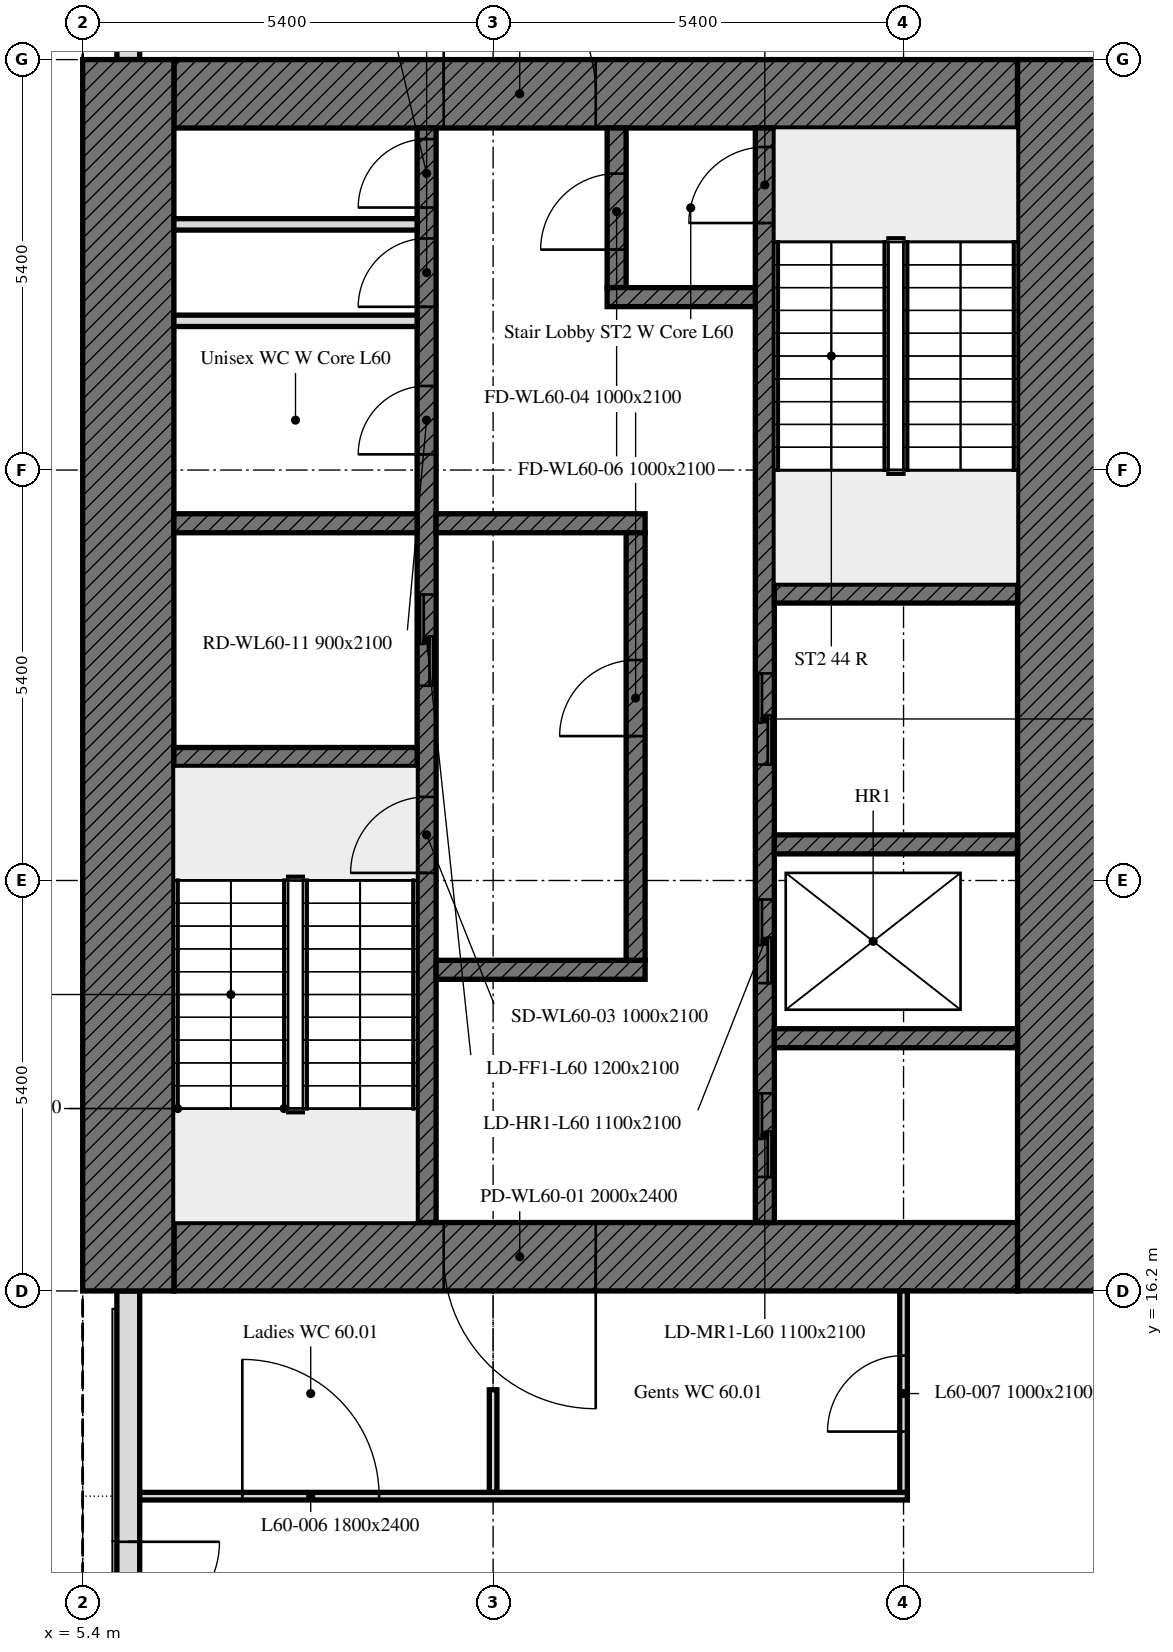
"""IFC4 building model, lengths in metres.
Left out: names, types, materials, properties, quantities, classifications, styles, units other than length and angle.
Written with IfcOpenShell. Run it as: python <this file> out.ifc"""

import sys

from ifc_helpers import new_model, si_unit, direction, frame, frame_2d, origin, place, context, subcontext, project, spatial, rectangle, extrude, element, fill, save


model = new_model("IFC4")
c1 = context("Model", 3, precision=1e-05, world=origin(), true_north=direction((0.0, 1.0)))
c2 = subcontext(c1, "Body", "Model", "MODEL_VIEW")
j1 = project(units=[si_unit("LENGTHUNIT", "METRE"), si_unit("PLANEANGLEUNIT", "RADIAN")], contexts=[c1])
p1 = place(None, origin())
s1 = spatial("IfcSite", under=j1, at=p1, CompositionType="ELEMENT")
p2 = place(p1, origin())
s2 = spatial("IfcBuilding", under=s1, at=p2, CompositionType="ELEMENT")
p3 = place(p2, frame((0.0, 0.0, 243.1)))
s3 = spatial("IfcBuildingStorey", under=s2, at=p3, CompositionType="ELEMENT", Elevation=243.1)
p4 = place(p3, frame((6.0, 42.6, 0.0), z_axis=(0.0, 0.0, 1.0), x_axis=(0.0, -1.0, 0.0)))
e1 = element("IfcWall", 1, at=p4, inside=s3, PredefinedType="SOLIDWALL", context=c2, shape_type="SweptSolid", body=[
    extrude(rectangle(XDim=10.2, YDim=0.3, at=frame_2d((5.1, 0.0))), origin(), (0.0, 0.0, 1.0), 7.5),
])
p5 = place(p4, frame((1.2, 0.0, 0.0)))
e2 = element("IfcOpeningElement", 2, at=p5, cuts=e1, PredefinedType="OPENING", context=c2, shape_type="SweptSolid", body=[
    extrude(rectangle(XDim=1.8, YDim=2.4, at=frame_2d((0.9, 1.2))), frame((0.0, 0.16, 0.0), z_axis=(0.0, -1.0, 0.0), x_axis=(1.0, 0.0, 0.0)), (0.0, 0.0, 1.0), 0.32),
])
p6 = place(p4, frame((7.4, 0.0, 0.0)))
e3 = element("IfcOpeningElement", 3, at=p6, cuts=e1, PredefinedType="OPENING", context=c2, shape_type="SweptSolid", body=[
    extrude(rectangle(XDim=1.8, YDim=2.4, at=frame_2d((0.9, 1.2))), frame((0.0, 0.16, 0.0), z_axis=(0.0, -1.0, 0.0), x_axis=(1.0, 0.0, 0.0)), (0.0, 0.0, 1.0), 0.32),
])
p7 = place(p3, frame((6.0, 16.2, 0.0), z_axis=(0.0, 0.0, 1.0), x_axis=(0.0, -1.0, 0.0)))
e4 = element("IfcWall", 4, at=p7, inside=s3, PredefinedType="SOLIDWALL", context=c2, shape_type="SweptSolid", body=[
    extrude(rectangle(XDim=15.75, YDim=0.3, at=frame_2d((7.875, 0.0))), origin(), (0.0, 0.0, 1.0), 7.5),
])
p8 = place(p7, frame((3.3, 0.0, 0.0)))
e5 = element("IfcOpeningElement", 5, at=p8, cuts=e4, PredefinedType="OPENING", context=c2, shape_type="SweptSolid", body=[
    extrude(rectangle(XDim=1.2, YDim=2.4, at=frame_2d((0.6, 1.2))), frame((0.0, 0.16, 0.0), z_axis=(0.0, -1.0, 0.0), x_axis=(1.0, 0.0, 0.0)), (0.0, 0.0, 1.0), 0.32),
])
p9 = place(p7, frame((7.2, 0.0, 0.0)))
e6 = element("IfcOpeningElement", 6, at=p9, cuts=e4, PredefinedType="OPENING", context=c2, shape_type="SweptSolid", body=[
    extrude(rectangle(XDim=1.8, YDim=2.4, at=frame_2d((0.9, 1.2))), frame((0.0, 0.16, 0.0), z_axis=(0.0, -1.0, 0.0), x_axis=(1.0, 0.0, 0.0)), (0.0, 0.0, 1.0), 0.32),
])
p10 = place(p7, frame((12.6, 0.0, 0.0)))
e7 = element("IfcOpeningElement", 7, at=p10, cuts=e4, PredefinedType="OPENING", context=c2, shape_type="SweptSolid", body=[
    extrude(rectangle(XDim=1.8, YDim=2.4, at=frame_2d((0.9, 1.2))), frame((0.0, 0.16, 0.0), z_axis=(0.0, -1.0, 0.0), x_axis=(1.0, 0.0, 0.0)), (0.0, 0.0, 1.0), 0.32),
])
p11 = place(p3, frame((17.7, 16.65, 0.0), z_axis=(0.0, 0.0, 1.0), x_axis=(-1.0, 0.0, 0.0)))
e8 = element("IfcWall", 8, at=p11, inside=s3, PredefinedType="SOLIDWALL", context=c2, shape_type="SweptSolid", body=[
    extrude(rectangle(XDim=11.1, YDim=0.9, at=frame_2d((5.55, 0.0))), origin(), (0.0, 0.0, 1.0), 7.5),
])
p12 = place(p11, frame((5.55, 0.0, 0.0)))
e9 = element("IfcOpeningElement", 9, at=p12, cuts=e8, PredefinedType="OPENING", context=c2, shape_type="SweptSolid", body=[
    extrude(rectangle(XDim=2.0, YDim=2.4, at=frame_2d((1.0, 1.2))), frame((0.0, 0.45, 0.0), z_axis=(0.0, -1.0, 0.0), x_axis=(1.0, 0.0, 0.0)), (0.0, 0.0, 1.0), 0.9),
])
p13 = place(p3, frame((6.6, 31.95, 0.0), z_axis=(0.0, 0.0, 1.0), x_axis=(1.0, 0.0, 0.0)))
e10 = element("IfcWall", 10, at=p13, inside=s3, PredefinedType="SOLIDWALL", context=c2, shape_type="SweptSolid", body=[
    extrude(rectangle(XDim=11.1, YDim=0.9, at=frame_2d((5.55, 0.0))), origin(), (0.0, 0.0, 1.0), 7.5),
])
p14 = place(p13, frame((3.55, 0.0, 0.0)))
e11 = element("IfcOpeningElement", 11, at=p14, cuts=e10, PredefinedType="OPENING", context=c2, shape_type="SweptSolid", body=[
    extrude(rectangle(XDim=2.0, YDim=2.4, at=frame_2d((1.0, 1.2))), frame((0.0, 0.45, 0.0), z_axis=(0.0, -1.0, 0.0), x_axis=(1.0, 0.0, 0.0)), (0.0, 0.0, 1.0), 0.9),
])
for number, where, z_axis, x_axis in (
    (12, (6.0, 16.2, 0.0), (0.0, 0.0, 1.0), (0.0, 1.0, 0.0)),
    (13, (18.3, 32.4, 0.0), (0.0, 0.0, 1.0), (0.0, -1.0, 0.0)),
):
    element("IfcWall", number, at=place(p3, frame(where, z_axis=z_axis, x_axis=x_axis)), inside=s3, PredefinedType="SOLIDWALL", context=c2, shape_type="SweptSolid", body=[
        extrude(rectangle(XDim=16.2, YDim=1.2, at=frame_2d((8.1, 0.0))), origin(), (0.0, 0.0, 1.0), 7.5),
    ])
p15 = place(p3, frame((9.925, 17.1, 0.0), z_axis=(0.0, 0.0, 1.0), x_axis=(0.0, 1.0, 0.0)))
e14 = element("IfcWall", 14, at=p15, inside=s3, PredefinedType="SOLIDWALL", context=c2, shape_type="SweptSolid", body=[
    extrude(rectangle(XDim=14.4, YDim=0.25, at=frame_2d((7.2, 0.0))), origin(), (0.0, 0.0, 1.0), 7.5),
])
p16 = place(p15, frame((4.6, 0.0, 0.0)))
e15 = element("IfcOpeningElement", 15, at=p16, cuts=e14, PredefinedType="OPENING", context=c2, shape_type="SweptSolid", body=[
    extrude(rectangle(XDim=1.0, YDim=2.1, at=frame_2d((0.5, 1.05))), frame((0.0, 0.125, 0.0), z_axis=(0.0, -1.0, 0.0), x_axis=(1.0, 0.0, 0.0)), (0.0, 0.0, 1.0), 0.25),
])
p17 = place(p15, frame((7.062, 0.0, 0.0)))
e16 = element("IfcOpeningElement", 16, at=p17, cuts=e14, PredefinedType="OPENING", context=c2, shape_type="SweptSolid", body=[
    extrude(rectangle(XDim=1.2, YDim=2.1, at=frame_2d((0.6, 1.05))), frame((0.0, 0.125, 0.0), z_axis=(0.0, -1.0, 0.0), x_axis=(1.0, 0.0, 0.0)), (0.0, 0.0, 1.0), 0.25),
])
p18 = place(p15, frame((10.106, 0.0, 0.0)))
e17 = element("IfcOpeningElement", 17, at=p18, cuts=e14, PredefinedType="OPENING", context=c2, shape_type="SweptSolid", body=[
    extrude(rectangle(XDim=0.9, YDim=2.1, at=frame_2d((0.45, 1.05))), frame((0.0, 0.125, 0.0), z_axis=(0.0, -1.0, 0.0), x_axis=(1.0, 0.0, 0.0)), (0.0, 0.0, 1.0), 0.25),
])
p19 = place(p15, frame((12.048, 0.0, 0.0)))
e18 = element("IfcOpeningElement", 18, at=p19, cuts=e14, PredefinedType="OPENING", context=c2, shape_type="SweptSolid", body=[
    extrude(rectangle(XDim=0.9, YDim=2.1, at=frame_2d((0.45, 1.05))), frame((0.0, 0.125, 0.0), z_axis=(0.0, -1.0, 0.0), x_axis=(1.0, 0.0, 0.0)), (0.0, 0.0, 1.0), 0.25),
])
p20 = place(p15, frame((13.354, 0.0, 0.0)))
e19 = element("IfcOpeningElement", 19, at=p20, cuts=e14, PredefinedType="OPENING", context=c2, shape_type="SweptSolid", body=[
    extrude(rectangle(XDim=0.9, YDim=2.1, at=frame_2d((0.45, 1.05))), frame((0.0, 0.125, 0.0), z_axis=(0.0, -1.0, 0.0), x_axis=(1.0, 0.0, 0.0)), (0.0, 0.0, 1.0), 0.25),
])
p21 = place(p3, frame((14.375, 17.1, 0.0), z_axis=(0.0, 0.0, 1.0), x_axis=(0.0, 1.0, 0.0)))
e20 = element("IfcWall", 20, at=p21, inside=s3, PredefinedType="SOLIDWALL", context=c2, shape_type="SweptSolid", body=[
    extrude(rectangle(XDim=14.4, YDim=0.25, at=frame_2d((7.2, 0.0))), origin(), (0.0, 0.0, 1.0), 7.5),
])
p22 = place(p21, frame((13.15, 0.0, 0.0)))
e21 = element("IfcOpeningElement", 21, at=p22, cuts=e20, PredefinedType="OPENING", context=c2, shape_type="SweptSolid", body=[
    extrude(rectangle(XDim=1.0, YDim=2.1, at=frame_2d((0.5, 1.05))), frame((0.0, 0.125, 0.0), z_axis=(0.0, -1.0, 0.0), x_axis=(1.0, 0.0, 0.0)), (0.0, 0.0, 1.0), 0.25),
])
p23 = place(p21, frame((0.6, 0.0, 0.0)))
e22 = element("IfcOpeningElement", 22, at=p23, cuts=e20, PredefinedType="OPENING", context=c2, shape_type="SweptSolid", body=[
    extrude(rectangle(XDim=1.1, YDim=2.1, at=frame_2d((0.55, 1.05))), frame((0.0, 0.125, 0.0), z_axis=(0.0, -1.0, 0.0), x_axis=(1.0, 0.0, 0.0)), (0.0, 0.0, 1.0), 0.25),
])
p24 = place(p21, frame((3.15, 0.0, 0.0)))
e23 = element("IfcOpeningElement", 23, at=p24, cuts=e20, PredefinedType="OPENING", context=c2, shape_type="SweptSolid", body=[
    extrude(rectangle(XDim=1.1, YDim=2.1, at=frame_2d((0.55, 1.05))), frame((0.0, 0.125, 0.0), z_axis=(0.0, -1.0, 0.0), x_axis=(1.0, 0.0, 0.0)), (0.0, 0.0, 1.0), 0.25),
])
p25 = place(p21, frame((6.025, 0.0, 0.0)))
e24 = element("IfcOpeningElement", 24, at=p25, cuts=e20, PredefinedType="OPENING", context=c2, shape_type="SweptSolid", body=[
    extrude(rectangle(XDim=1.2, YDim=2.1, at=frame_2d((0.6, 1.05))), frame((0.0, 0.125, 0.0), z_axis=(0.0, -1.0, 0.0), x_axis=(1.0, 0.0, 0.0)), (0.0, 0.0, 1.0), 0.25),
])
for number, where, z_axis, x_axis in (
    (25, (6.6, 23.225, 0.0), (0.0, 0.0, 1.0), (1.0, 0.0, 0.0)),
    (26, (14.5, 25.375, 0.0), (0.0, 0.0, 1.0), (1.0, 0.0, 0.0)),
    (27, (14.5, 22.075, 0.0), (0.0, 0.0, 1.0), (1.0, 0.0, 0.0)),
    (28, (6.6, 26.3, 0.0), (0.0, 0.0, 1.0), (1.0, 0.0, 0.0)),
):
    element("IfcWall", number, at=place(p3, frame(where, z_axis=z_axis, x_axis=x_axis)), inside=s3, PredefinedType="SOLIDWALL", context=c2, shape_type="SweptSolid", body=[
        extrude(rectangle(XDim=3.2, YDim=0.25, at=frame_2d((1.6, 0.0))), origin(), (0.0, 0.0, 1.0), 7.5),
    ])
for number, where, z_axis, x_axis in (
    (29, (10.05, 26.3, 0.0), (0.0, 0.0, 1.0), (1.0, 0.0, 0.0)),
    (30, (10.05, 20.425, 0.0), (0.0, 0.0, 1.0), (1.0, 0.0, 0.0)),
):
    element("IfcWall", number, at=place(p3, frame(where, z_axis=z_axis, x_axis=x_axis)), inside=s3, PredefinedType="SOLIDWALL", context=c2, shape_type="SweptSolid", body=[
        extrude(rectangle(XDim=2.75, YDim=0.25, at=frame_2d((1.375, 0.0))), origin(), (0.0, 0.0, 1.0), 7.5),
    ])
p26 = place(p3, frame((12.425, 29.4, 0.0), z_axis=(0.0, 0.0, 1.0), x_axis=(0.0, 1.0, 0.0)))
e31 = element("IfcWall", 31, at=p26, inside=s3, PredefinedType="SOLIDWALL", context=c2, shape_type="SweptSolid", body=[
    extrude(rectangle(XDim=2.1, YDim=0.25, at=frame_2d((1.05, 0.0))), origin(), (0.0, 0.0, 1.0), 7.5),
])
p27 = place(p26, frame((0.5, 0.0, 0.0)))
e32 = element("IfcOpeningElement", 32, at=p27, cuts=e31, PredefinedType="OPENING", context=c2, shape_type="SweptSolid", body=[
    extrude(rectangle(XDim=1.0, YDim=2.1, at=frame_2d((0.5, 1.05))), frame((0.0, 0.125, 0.0), z_axis=(0.0, -1.0, 0.0), x_axis=(1.0, 0.0, 0.0)), (0.0, 0.0, 1.0), 0.25),
])
p28 = place(p3, frame((12.3, 29.275, 0.0), z_axis=(0.0, 0.0, 1.0), x_axis=(1.0, 0.0, 0.0)))
e33 = element("IfcWall", 33, at=p28, inside=s3, PredefinedType="SOLIDWALL", context=c2, shape_type="SweptSolid", body=[
    extrude(rectangle(XDim=1.95, YDim=0.25, at=frame_2d((0.975, 0.0))), origin(), (0.0, 0.0, 1.0), 7.5),
])
p29 = place(p3, frame((12.675, 20.55, 0.0), z_axis=(0.0, 0.0, 1.0), x_axis=(0.0, 1.0, 0.0)))
e34 = element("IfcWall", 34, at=p29, inside=s3, PredefinedType="SOLIDWALL", context=c2, shape_type="SweptSolid", body=[
    extrude(rectangle(XDim=5.625, YDim=0.25, at=frame_2d((2.812, 0.0))), origin(), (0.0, 0.0, 1.0), 7.5),
])
p30 = place(p29, frame((2.95, 0.0, 0.0)))
e35 = element("IfcOpeningElement", 35, at=p30, cuts=e34, PredefinedType="OPENING", context=c2, shape_type="SweptSolid", body=[
    extrude(rectangle(XDim=1.0, YDim=2.1, at=frame_2d((0.5, 1.05))), frame((0.0, 0.125, 0.0), z_axis=(0.0, -1.0, 0.0), x_axis=(1.0, 0.0, 0.0)), (0.0, 0.0, 1.0), 0.25),
])
p31 = place(p3, frame((14.5, 19.525, 0.0), z_axis=(0.0, 0.0, 1.0), x_axis=(1.0, 0.0, 0.0)))
e36 = element("IfcWall", 36, at=p31, inside=s3, PredefinedType="SOLIDWALL", context=c2, shape_type="SweptSolid", body=[
    extrude(rectangle(XDim=3.2, YDim=0.25, at=frame_2d((1.6, 0.0))), origin(), (0.0, 0.0, 1.0), 7.5),
])
for number, where, z_axis, x_axis in (
    (37, (6.6, 28.963, 0.0), (0.0, 0.0, 1.0), (1.0, 0.0, 0.0)),
    (38, (6.6, 30.232, 0.0), (0.0, 0.0, 1.0), (1.0, 0.0, 0.0)),
):
    element("IfcWall", number, at=place(p3, frame(where, z_axis=z_axis, x_axis=x_axis)), inside=s3, PredefinedType="PARTITIONING", context=c2, shape_type="SweptSolid", body=[
        extrude(rectangle(XDim=3.2, YDim=0.15, at=frame_2d((1.6, 0.0))), origin(), (0.0, 0.0, 1.0), 7.5),
    ])
p32 = place(p3, frame((10.8, 13.55, 0.0), z_axis=(0.0, 0.0, 1.0), x_axis=(0.0, 1.0, 0.0)))
e39 = element("IfcWall", 39, at=p32, inside=s3, PredefinedType="PARTITIONING", context=c2, shape_type="SweptSolid", body=[
    extrude(rectangle(XDim=1.35, YDim=0.1, at=frame_2d((0.675, 0.0))), origin(), (0.0, 0.0, 1.0), 6.75),
])
p33 = place(p3, frame((6.151, 13.5, 0.0), z_axis=(0.0, 0.0, 1.0), x_axis=(1.0, 0.0, 0.0)))
e40 = element("IfcWall", 40, at=p33, inside=s3, PredefinedType="PARTITIONING", context=c2, shape_type="SweptSolid", body=[
    extrude(rectangle(XDim=10.099, YDim=0.1, at=frame_2d((5.05, 0.0))), origin(), (0.0, 0.0, 1.0), 6.75),
])
p34 = place(p33, frame((1.349, 0.0, 0.0)))
e41 = element("IfcOpeningElement", 41, at=p34, cuts=e40, PredefinedType="OPENING", context=c2, shape_type="SweptSolid", body=[
    extrude(rectangle(XDim=1.8, YDim=2.4, at=frame_2d((0.9, 1.2))), frame((0.0, 0.05, 0.0), z_axis=(0.0, -1.0, 0.0), x_axis=(1.0, 0.0, 0.0)), (0.0, 0.0, 1.0), 0.1),
])
p35 = place(p3, frame((16.2, 13.55, 0.0), z_axis=(0.0, 0.0, 1.0), x_axis=(0.0, 1.0, 0.0)))
e42 = element("IfcWall", 42, at=p35, inside=s3, PredefinedType="PARTITIONING", context=c2, shape_type="SweptSolid", body=[
    extrude(rectangle(XDim=2.65, YDim=0.1, at=frame_2d((1.325, 0.0))), origin(), (0.0, 0.0, 1.0), 6.75),
])
p36 = place(p35, frame((0.8, 0.0, 0.0)))
e43 = element("IfcOpeningElement", 43, at=p36, cuts=e42, PredefinedType="OPENING", context=c2, shape_type="SweptSolid", body=[
    extrude(rectangle(XDim=1.0, YDim=2.1, at=frame_2d((0.5, 1.05))), frame((0.0, 0.05, 0.0), z_axis=(0.0, -1.0, 0.0), x_axis=(1.0, 0.0, 0.0)), (0.0, 0.0, 1.0), 0.1),
])
p37 = place(p8, origin())
e44 = element("IfcDoor", 44, at=p37, inside=s3, OperationType="SINGLE_SWING_LEFT", PredefinedType="DOOR", context=c2, shape_type="SweptSolid", body=[
    extrude(rectangle(XDim=1.2, YDim=2.4, at=frame_2d((0.6, 1.2))), frame((0.0, 0.025, 0.0), z_axis=(0.0, -1.0, 0.0), x_axis=(1.0, 0.0, 0.0)), (0.0, 0.0, 1.0), 0.05),
])
fill(e5, e44)
p38 = place(p12, origin())
e45 = element("IfcDoor", 45, at=p38, inside=s3, OperationType="DOUBLE_DOOR_SINGLE_SWING", PredefinedType="DOOR", context=c2, shape_type="SweptSolid", body=[
    extrude(rectangle(XDim=2.0, YDim=2.4, at=frame_2d((1.0, 1.2))), frame((0.0, 0.025, 0.0), z_axis=(0.0, -1.0, 0.0), x_axis=(1.0, 0.0, 0.0)), (0.0, 0.0, 1.0), 0.05),
])
fill(e9, e45)
p39 = place(p14, origin())
e46 = element("IfcDoor", 46, at=p39, inside=s3, OperationType="DOUBLE_DOOR_SINGLE_SWING", PredefinedType="DOOR", context=c2, shape_type="SweptSolid", body=[
    extrude(rectangle(XDim=2.0, YDim=2.4, at=frame_2d((1.0, 1.2))), frame((0.0, 0.025, 0.0), z_axis=(0.0, -1.0, 0.0), x_axis=(1.0, 0.0, 0.0)), (0.0, 0.0, 1.0), 0.05),
])
fill(e11, e46)
p40 = place(p16, origin())
e47 = element("IfcDoor", 47, at=p40, inside=s3, OperationType="SINGLE_SWING_LEFT", PredefinedType="DOOR", context=c2, shape_type="SweptSolid", body=[
    extrude(rectangle(XDim=1.0, YDim=2.1, at=frame_2d((0.5, 1.05))), frame((0.0, 0.025, 0.0), z_axis=(0.0, -1.0, 0.0), x_axis=(1.0, 0.0, 0.0)), (0.0, 0.0, 1.0), 0.05),
])
fill(e15, e47)
p41 = place(p30, origin())
e48 = element("IfcDoor", 48, at=p41, inside=s3, OperationType="SINGLE_SWING_LEFT", PredefinedType="DOOR", context=c2, shape_type="SweptSolid", body=[
    extrude(rectangle(XDim=1.0, YDim=2.1, at=frame_2d((0.5, 1.05))), frame((0.0, 0.025, 0.0), z_axis=(0.0, -1.0, 0.0), x_axis=(1.0, 0.0, 0.0)), (0.0, 0.0, 1.0), 0.05),
])
fill(e35, e48)
p42 = place(p22, origin())
e49 = element("IfcDoor", 49, at=p42, inside=s3, OperationType="SINGLE_SWING_LEFT", PredefinedType="DOOR", context=c2, shape_type="SweptSolid", body=[
    extrude(rectangle(XDim=1.0, YDim=2.1, at=frame_2d((0.5, 1.05))), frame((0.0, 0.025, 0.0), z_axis=(0.0, -1.0, 0.0), x_axis=(1.0, 0.0, 0.0)), (0.0, 0.0, 1.0), 0.05),
])
fill(e21, e49)
p43 = place(p27, origin())
e50 = element("IfcDoor", 50, at=p43, inside=s3, OperationType="SINGLE_SWING_LEFT", PredefinedType="DOOR", context=c2, shape_type="SweptSolid", body=[
    extrude(rectangle(XDim=1.0, YDim=2.1, at=frame_2d((0.5, 1.05))), frame((0.0, 0.025, 0.0), z_axis=(0.0, -1.0, 0.0), x_axis=(1.0, 0.0, 0.0)), (0.0, 0.0, 1.0), 0.05),
])
fill(e32, e50)
p44 = place(p17, origin())
e51 = element("IfcDoor", 51, at=p44, inside=s3, OperationType="DOUBLE_DOOR_SLIDING", PredefinedType="DOOR", context=c2, shape_type="SweptSolid", body=[
    extrude(rectangle(XDim=1.2, YDim=2.1, at=frame_2d((0.6, 1.05))), frame((0.0, 0.025, 0.0), z_axis=(0.0, -1.0, 0.0), x_axis=(1.0, 0.0, 0.0)), (0.0, 0.0, 1.0), 0.05),
])
fill(e16, e51)
p45 = place(p23, origin())
e52 = element("IfcDoor", 52, at=p45, inside=s3, OperationType="DOUBLE_DOOR_SLIDING", PredefinedType="DOOR", context=c2, shape_type="SweptSolid", body=[
    extrude(rectangle(XDim=1.1, YDim=2.1, at=frame_2d((0.55, 1.05))), frame((0.0, 0.025, 0.0), z_axis=(0.0, -1.0, 0.0), x_axis=(1.0, 0.0, 0.0)), (0.0, 0.0, 1.0), 0.05),
])
fill(e22, e52)
p46 = place(p24, origin())
e53 = element("IfcDoor", 53, at=p46, inside=s3, OperationType="DOUBLE_DOOR_SLIDING", PredefinedType="DOOR", context=c2, shape_type="SweptSolid", body=[
    extrude(rectangle(XDim=1.1, YDim=2.1, at=frame_2d((0.55, 1.05))), frame((0.0, 0.025, 0.0), z_axis=(0.0, -1.0, 0.0), x_axis=(1.0, 0.0, 0.0)), (0.0, 0.0, 1.0), 0.05),
])
fill(e23, e53)
p47 = place(p25, origin())
e54 = element("IfcDoor", 54, at=p47, inside=s3, OperationType="DOUBLE_DOOR_SLIDING", PredefinedType="DOOR", context=c2, shape_type="SweptSolid", body=[
    extrude(rectangle(XDim=1.2, YDim=2.1, at=frame_2d((0.6, 1.05))), frame((0.0, 0.025, 0.0), z_axis=(0.0, -1.0, 0.0), x_axis=(1.0, 0.0, 0.0)), (0.0, 0.0, 1.0), 0.05),
])
fill(e24, e54)
p48 = place(p18, origin())
e55 = element("IfcDoor", 55, at=p48, inside=s3, OperationType="SINGLE_SWING_LEFT", PredefinedType="DOOR", context=c2, shape_type="SweptSolid", body=[
    extrude(rectangle(XDim=0.9, YDim=2.1, at=frame_2d((0.45, 1.05))), frame((0.0, 0.025, 0.0), z_axis=(0.0, -1.0, 0.0), x_axis=(1.0, 0.0, 0.0)), (0.0, 0.0, 1.0), 0.05),
])
fill(e17, e55)
p49 = place(p19, origin())
e56 = element("IfcDoor", 56, at=p49, inside=s3, OperationType="SINGLE_SWING_LEFT", PredefinedType="DOOR", context=c2, shape_type="SweptSolid", body=[
    extrude(rectangle(XDim=0.9, YDim=2.1, at=frame_2d((0.45, 1.05))), frame((0.0, 0.025, 0.0), z_axis=(0.0, -1.0, 0.0), x_axis=(1.0, 0.0, 0.0)), (0.0, 0.0, 1.0), 0.05),
])
fill(e18, e56)
p50 = place(p20, origin())
e57 = element("IfcDoor", 57, at=p50, inside=s3, OperationType="SINGLE_SWING_LEFT", PredefinedType="DOOR", context=c2, shape_type="SweptSolid", body=[
    extrude(rectangle(XDim=0.9, YDim=2.1, at=frame_2d((0.45, 1.05))), frame((0.0, 0.025, 0.0), z_axis=(0.0, -1.0, 0.0), x_axis=(1.0, 0.0, 0.0)), (0.0, 0.0, 1.0), 0.05),
])
fill(e19, e57)
p51 = place(p34, origin())
e58 = element("IfcDoor", 58, at=p51, inside=s3, OperationType="DOUBLE_DOOR_SINGLE_SWING", PredefinedType="DOOR", context=c2, shape_type="SweptSolid", body=[
    extrude(rectangle(XDim=1.8, YDim=2.4, at=frame_2d((0.9, 1.2))), frame((0.0, 0.025, 0.0), z_axis=(0.0, -1.0, 0.0), x_axis=(1.0, 0.0, 0.0)), (0.0, 0.0, 1.0), 0.05),
])
fill(e41, e58)
p52 = place(p36, origin())
e59 = element("IfcDoor", 59, at=p52, inside=s3, OperationType="SINGLE_SWING_RIGHT", PredefinedType="DOOR", context=c2, shape_type="SweptSolid", body=[
    extrude(rectangle(XDim=1.0, YDim=2.1, at=frame_2d((0.5, 1.05))), frame((0.0, 0.025, 0.0), z_axis=(0.0, -1.0, 0.0), x_axis=(1.0, 0.0, 0.0)), (0.0, 0.0, 1.0), 0.05),
])
fill(e43, e59)
save(model, sys.argv[1])
